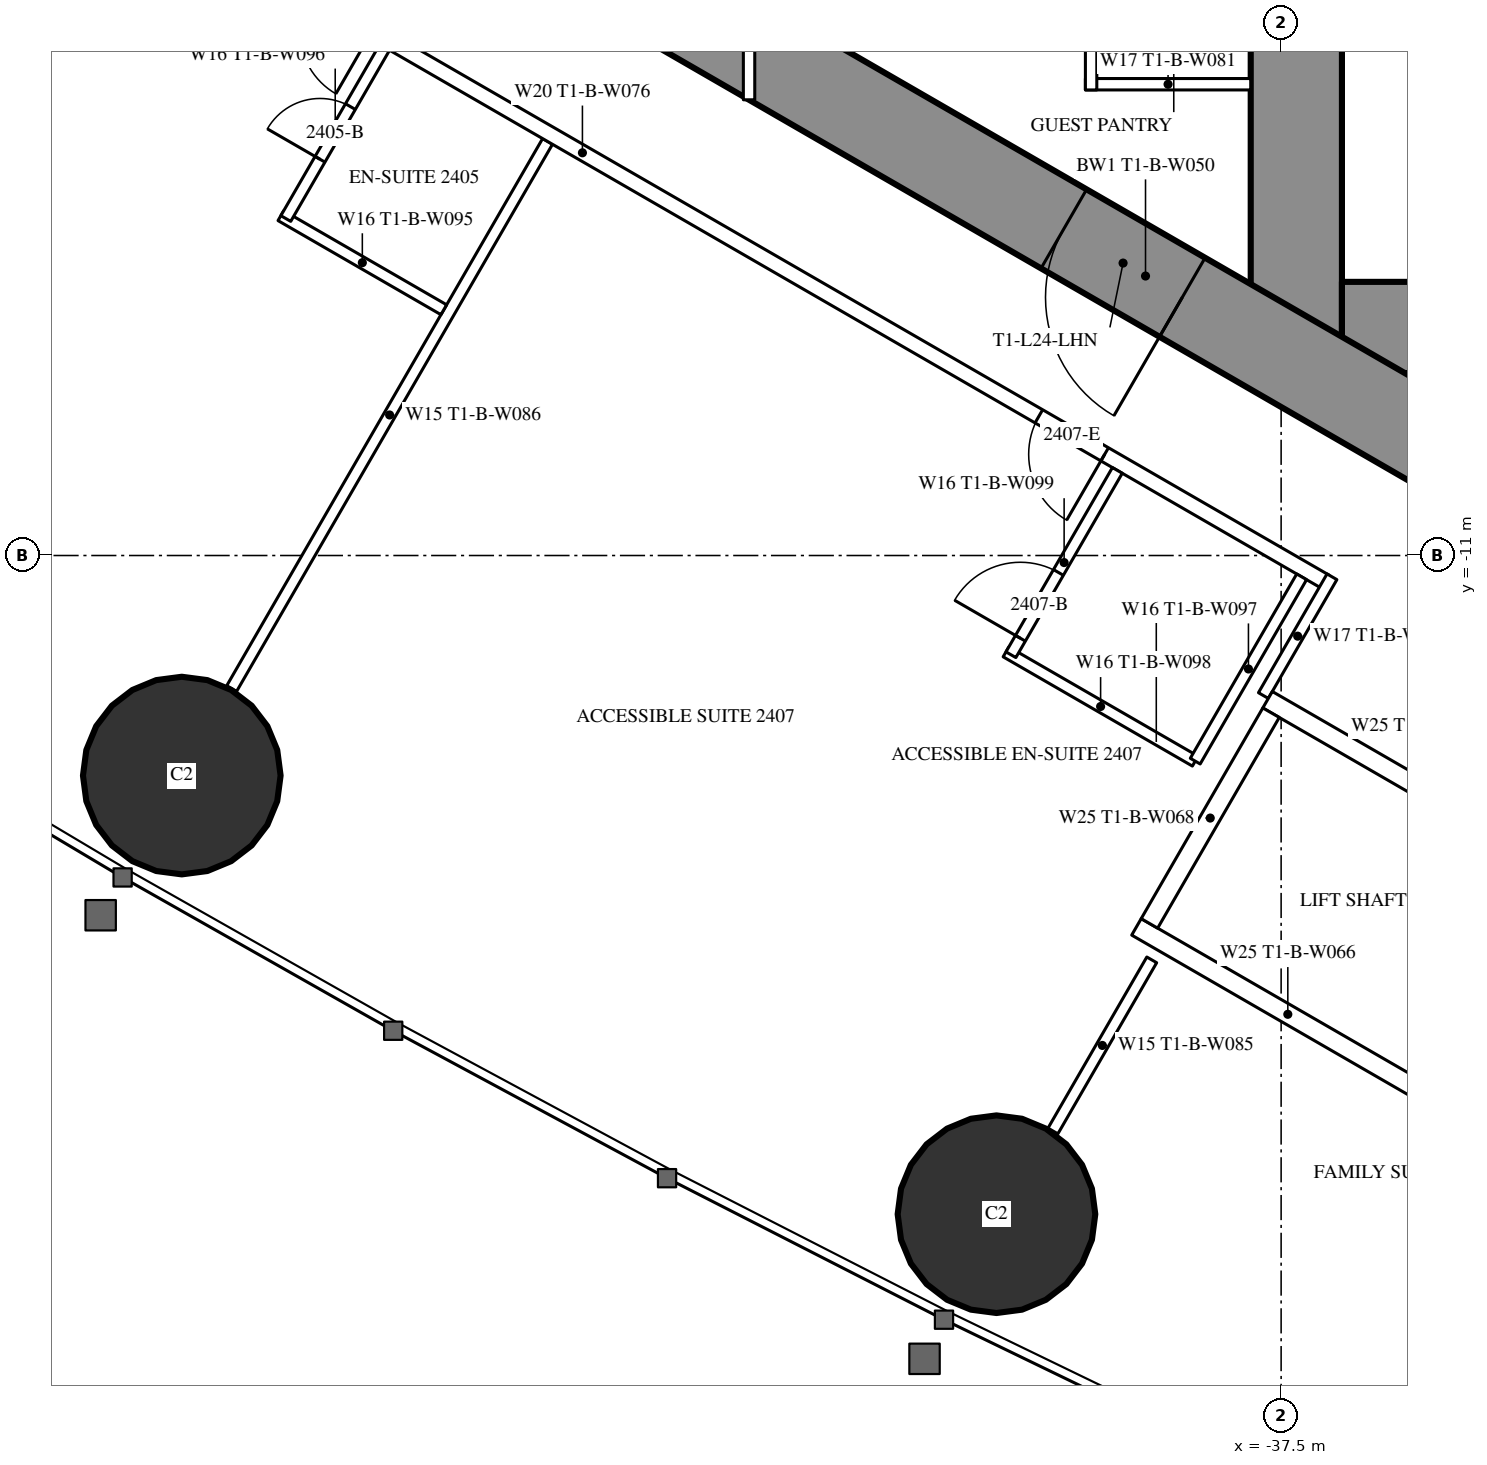
"""IFC4 building model, lengths in metres.
Left out: names, types, materials, properties, quantities, classifications, styles, units other than length and angle.
Written with IfcOpenShell. Run it as: python <this file> out.ifc"""

import sys

from ifc_helpers import new_model, si_unit, direction, frame, frame_2d, origin, origin_2d, place, context, subcontext, project, spatial, rectangle, hollow_circle, extrude, element, fill, save


model = new_model("IFC4")
c1 = context("Model", 3, precision=1e-05, world=origin(), true_north=direction((0.0, 1.0)))
c2 = subcontext(c1, "Body", "Model", "MODEL_VIEW")
j1 = project(units=[si_unit("LENGTHUNIT", "METRE"), si_unit("PLANEANGLEUNIT", "RADIAN")], contexts=[c1])
p1 = place(None, origin())
s1 = spatial("IfcSite", under=j1, at=p1, CompositionType="ELEMENT")
p2 = place(p1, origin())
s2 = spatial("IfcBuilding", under=s1, at=p2, CompositionType="ELEMENT")
p3 = place(p2, frame((0.0, 0.0, 94.1)))
s3 = spatial("IfcBuildingStorey", under=s2, at=p3, CompositionType="ELEMENT", Elevation=94.1)
for number, where, z_axis, x_axis in (
    (1, (-51.963, -13.895, 0.0), (0.0, 0.0, 1.0), (1.0, 0.0, 0.0)),
    (2, (-41.245, -19.666, 0.0), (0.0, 0.0, 1.0), (1.0, 0.0, 0.0)),
):
    element("IfcColumn", number, at=place(p3, frame(where, z_axis=z_axis, x_axis=x_axis)), inside=s3, PredefinedType="COLUMN", context=c2, shape_type="SweptSolid", body=[
        extrude(hollow_circle(Radius=1.3, WallThickness=0.1, at=origin_2d()), origin(), (0.0, 0.0, 1.0), 3.5),
    ])
p4 = place(p3, frame((-37.3, 8.6, 0.0), z_axis=(0.0, 0.0, 1.0), x_axis=(0.0, -1.0, 0.0)))
e3 = element("IfcWall", 3, at=p4, inside=s3, PredefinedType="SHEAR", context=c2, shape_type="SweptSolid", body=[
    extrude(rectangle(XDim=17.2, YDim=1.2, at=frame_2d((8.6, 0.0))), origin(), (0.0, 0.0, 1.0), 3.5),
])
p5 = place(p4, frame((7.7, 0.0, 0.0)))
e4 = element("IfcOpeningElement", 4, at=p5, cuts=e3, PredefinedType="OPENING", context=c2, shape_type="SweptSolid", body=[
    extrude(rectangle(XDim=1.8, YDim=2.2, at=frame_2d((0.9, 1.1))), frame((0.0, 0.61, 0.0), z_axis=(0.0, -1.0, 0.0), x_axis=(1.0, 0.0, 0.0)), (0.0, 0.0, 1.0), 1.22),
])
p6 = place(p3, frame((-28.3, -8.0, 0.0), z_axis=(0.0, 0.0, 1.0), x_axis=(-1.0, 0.0, 0.0)))
e5 = element("IfcWall", 5, at=p6, inside=s3, PredefinedType="SHEAR", context=c2, shape_type="SweptSolid", body=[
    extrude(rectangle(XDim=8.4, YDim=1.2, at=frame_2d((4.2, 0.0))), origin(), (0.0, 0.0, 1.0), 3.5),
])
p7 = place(p6, frame((0.25, 0.0, 0.0)))
e6 = element("IfcOpeningElement", 6, at=p7, cuts=e5, PredefinedType="OPENING", context=c2, shape_type="SweptSolid", body=[
    extrude(rectangle(XDim=1.0, YDim=2.2, at=frame_2d((0.5, 1.1))), frame((0.0, 0.61, 0.0), z_axis=(0.0, -1.0, 0.0), x_axis=(1.0, 0.0, 0.0)), (0.0, 0.0, 1.0), 1.22),
])
p8 = place(p3, frame((-27.2, -14.3, 0.0), z_axis=(0.0, 0.0, 1.0), x_axis=(-0.866024021859, 0.500002393557, 0.0)))
e7 = element("IfcWall", 7, at=p8, inside=s3, PredefinedType="SHEAR", context=c2, shape_type="SweptSolid", body=[
    extrude(rectangle(XDim=27.907, YDim=1.2, at=frame_2d((13.954, 0.0))), origin(), (0.0, 0.0, 1.0), 3.5),
])
p9 = place(p8, frame((4.6, 0.0, 0.0)))
e8 = element("IfcOpeningElement", 8, at=p9, cuts=e7, PredefinedType="OPENING", context=c2, shape_type="SweptSolid", body=[
    extrude(rectangle(XDim=1.0, YDim=2.2, at=frame_2d((0.5, 1.1))), frame((0.0, 0.61, 0.0), z_axis=(0.0, -1.0, 0.0), x_axis=(1.0, 0.0, 0.0)), (0.0, 0.0, 1.0), 1.22),
])
p10 = place(p8, frame((13.395, 0.0, 0.0)))
e9 = element("IfcOpeningElement", 9, at=p10, cuts=e7, PredefinedType="OPENING", context=c2, shape_type="SweptSolid", body=[
    extrude(rectangle(XDim=1.8, YDim=2.2, at=frame_2d((0.9, 1.1))), frame((0.0, 0.61, 0.0), z_axis=(0.0, -1.0, 0.0), x_axis=(1.0, 0.0, 0.0)), (0.0, 0.0, 1.0), 1.22),
])
p11 = place(p3, frame((-47.151, -5.552, 0.0), z_axis=(0.0, 0.0, 1.0), x_axis=(-0.500003012045, -0.866023664773, 0.0)))
e10 = element("IfcWall", 10, at=p11, inside=s3, PredefinedType="PARTITIONING", context=c2, shape_type="SweptSolid", body=[
    extrude(rectangle(XDim=8.311, YDim=0.15, at=frame_2d((4.156, 0.0))), origin(), (0.0, 0.0, 1.0), 2.2),
])
p12 = place(p3, frame((-39.202, -16.32, 0.0), z_axis=(0.0, 0.0, 1.0), x_axis=(-0.49997716683, -0.86603858612, 0.0)))
e11 = element("IfcWall", 11, at=p12, inside=s3, PredefinedType="PARTITIONING", context=c2, shape_type="SweptSolid", body=[
    extrude(rectangle(XDim=2.6, YDim=0.15, at=frame_2d((1.3, 0.0))), origin(), (0.0, 0.0, 1.0), 3.25),
])
p13 = place(p3, frame((-36.92, -11.344, 0.0), z_axis=(0.0, 0.0, 1.0), x_axis=(-0.866028313256, 0.499994960614, 0.0)))
e12 = element("IfcWall", 12, at=p13, inside=s3, PredefinedType="PARTITIONING", context=c2, shape_type="SweptSolid", body=[
    extrude(rectangle(XDim=22.568, YDim=0.2, at=frame_2d((11.284, 0.0))), origin(), (0.0, 0.0, 1.0), 3.25),
])
p14 = place(p13, frame((14.481, 0.0, 0.0)))
e13 = element("IfcOpeningElement", 13, at=p14, cuts=e12, PredefinedType="OPENING", context=c2, shape_type="SweptSolid", body=[
    extrude(rectangle(XDim=0.95, YDim=2.2, at=frame_2d((0.475, 1.1))), frame((0.0, 0.11, 0.0), z_axis=(0.0, -1.0, 0.0), x_axis=(1.0, 0.0, 0.0)), (0.0, 0.0, 1.0), 0.22),
])
p15 = place(p13, frame((3.35, 0.0, 0.0)))
e14 = element("IfcOpeningElement", 14, at=p15, cuts=e12, PredefinedType="OPENING", context=c2, shape_type="SweptSolid", body=[
    extrude(rectangle(XDim=1.0, YDim=2.2, at=frame_2d((0.5, 1.1))), frame((0.0, 0.11, 0.0), z_axis=(0.0, -1.0, 0.0), x_axis=(1.0, 0.0, 0.0)), (0.0, 0.0, 1.0), 0.22),
])
p16 = place(p3, frame((-36.831, -11.28, 0.0), z_axis=(0.0, 0.0, 1.0), x_axis=(-0.499937177781, -0.866061671171, 0.0)))
e15 = element("IfcWall", 15, at=p16, inside=s3, PredefinedType="PARTITIONING", context=c2, shape_type="SweptSolid", body=[
    extrude(rectangle(XDim=1.804, YDim=0.15, at=frame_2d((0.902, 0.0))), origin(), (0.0, 0.0, 1.0), 3.25),
])
p17 = place(p3, frame((-48.516, -7.767, 0.0), z_axis=(0.0, 0.0, 1.0), x_axis=(-0.866031185235, 0.4999899861, 0.0)))
e16 = element("IfcWall", 16, at=p17, inside=s3, PredefinedType="PARTITIONING", context=c2, shape_type="SweptSolid", body=[
    extrude(rectangle(XDim=2.475, YDim=0.15, at=frame_2d((1.238, 0.0))), origin(), (0.0, 0.0, 1.0), 3.25),
])
p18 = place(p3, frame((-49.295, -4.315, 0.0), z_axis=(0.0, 0.0, 1.0), x_axis=(-0.499936506574, -0.866062058628, 0.0)))
e17 = element("IfcWall", 17, at=p18, inside=s3, PredefinedType="PARTITIONING", context=c2, shape_type="SweptSolid", body=[
    extrude(rectangle(XDim=2.6, YDim=0.15, at=frame_2d((1.3, 0.0))), origin(), (0.0, 0.0, 1.0), 3.25),
])
p19 = place(p18, frame((0.9, 0.0, 0.0)))
e18 = element("IfcOpeningElement", 18, at=p19, cuts=e17, PredefinedType="OPENING", context=c2, shape_type="SweptSolid", body=[
    extrude(rectangle(XDim=0.8, YDim=2.2, at=frame_2d((0.4, 1.1))), frame((0.0, 0.085, 0.0), z_axis=(0.0, -1.0, 0.0), x_axis=(1.0, 0.0, 0.0)), (0.0, 0.0, 1.0), 0.17),
])
p20 = place(p3, frame((-38.63, -13.705, 0.0), z_axis=(0.0, 0.0, 1.0), x_axis=(-0.866018712932, 0.500011588718, 0.0)))
e19 = element("IfcWall", 19, at=p20, inside=s3, PredefinedType="PARTITIONING", context=c2, shape_type="SweptSolid", body=[
    extrude(rectangle(XDim=2.875, YDim=0.15, at=frame_2d((1.438, 0.0))), origin(), (0.0, 0.0, 1.0), 3.25),
])
p21 = place(p3, frame((-39.655, -9.88, 0.0), z_axis=(0.0, 0.0, 1.0), x_axis=(-0.500049511043, -0.865996816683, 0.0)))
e20 = element("IfcWall", 20, at=p21, inside=s3, PredefinedType="PARTITIONING", context=c2, shape_type="SweptSolid", body=[
    extrude(rectangle(XDim=2.8, YDim=0.15, at=frame_2d((1.4, 0.0))), origin(), (0.0, 0.0, 1.0), 3.25),
])
p22 = place(p21, frame((1.55, 0.0, 0.0)))
e21 = element("IfcOpeningElement", 21, at=p22, cuts=e20, PredefinedType="OPENING", context=c2, shape_type="SweptSolid", body=[
    extrude(rectangle(XDim=1.0, YDim=2.2, at=frame_2d((0.5, 1.1))), frame((0.0, 0.085, 0.0), z_axis=(0.0, -1.0, 0.0), x_axis=(1.0, 0.0, 0.0)), (0.0, 0.0, 1.0), 0.17),
])
p23 = place(p3, frame((-37.23, -11.281, 0.0), z_axis=(0.0, 0.0, 1.0), x_axis=(-0.500049511043, -0.865996816683, 0.0)))
e22 = element("IfcWall", 22, at=p23, inside=s3, PredefinedType="PARTITIONING", context=c2, shape_type="SweptSolid", body=[
    extrude(rectangle(XDim=2.8, YDim=0.15, at=frame_2d((1.4, 0.0))), origin(), (0.0, 0.0, 1.0), 3.25),
])
p24 = place(p3, frame((-37.9, -4.8, 0.0), z_axis=(0.0, 0.0, 1.0), x_axis=(-1.0, 0.0, 0.0)))
e23 = element("IfcWall", 23, at=p24, inside=s3, PredefinedType="PARTITIONING", context=c2, shape_type="SweptSolid", body=[
    extrude(rectangle(XDim=2.175, YDim=0.15, at=frame_2d((1.087, 0.0))), origin(), (0.0, 0.0, 1.0), 3.25),
])
p25 = place(p3, frame((-40.0, -2.525, 0.0), z_axis=(0.0, 0.0, 1.0), x_axis=(0.0, -1.0, 0.0)))
e24 = element("IfcWall", 24, at=p25, inside=s3, PredefinedType="PARTITIONING", context=c2, shape_type="SweptSolid", body=[
    extrude(rectangle(XDim=2.35, YDim=0.15, at=frame_2d((1.175, 0.0))), origin(), (0.0, 0.0, 1.0), 3.25),
])
p26 = place(p25, frame((0.675, 0.0, 0.0)))
e25 = element("IfcOpeningElement", 25, at=p26, cuts=e24, PredefinedType="OPENING", context=c2, shape_type="SweptSolid", body=[
    extrude(rectangle(XDim=1.0, YDim=2.2, at=frame_2d((0.5, 1.1))), frame((0.0, 0.085, 0.0), z_axis=(0.0, -1.0, 0.0), x_axis=(1.0, 0.0, 0.0)), (0.0, 0.0, 1.0), 0.17),
])
p27 = place(p3, frame((-44.5, 5.005, 0.0), z_axis=(0.0, 0.0, 1.0), x_axis=(0.0, -1.0, 0.0)))
e26 = element("IfcWall", 26, at=p27, inside=s3, PredefinedType="PARTITIONING", context=c2, shape_type="SweptSolid", body=[
    extrude(rectangle(XDim=10.009, YDim=0.15, at=frame_2d((5.005, 0.0))), origin(), (0.0, 0.0, 1.0), 2.45),
])
p28 = place(p27, frame((2.002, 0.0, 0.0)))
e27 = element("IfcOpeningElement", 27, at=p28, cuts=e26, PredefinedType="OPENING", context=c2, shape_type="SweptSolid", body=[
    extrude(rectangle(XDim=1.0, YDim=2.2, at=frame_2d((0.5, 1.1))), frame((0.0, 0.085, 0.0), z_axis=(0.0, -1.0, 0.0), x_axis=(1.0, 0.0, 0.0)), (0.0, 0.0, 1.0), 0.17),
])
p29 = place(p27, frame((7.007, 0.0, 0.0)))
e28 = element("IfcOpeningElement", 28, at=p29, cuts=e26, PredefinedType="OPENING", context=c2, shape_type="SweptSolid", body=[
    extrude(rectangle(XDim=1.0, YDim=2.2, at=frame_2d((0.5, 1.1))), frame((0.0, 0.085, 0.0), z_axis=(0.0, -1.0, 0.0), x_axis=(1.0, 0.0, 0.0)), (0.0, 0.0, 1.0), 0.17),
])
p30 = place(p3, frame((-33.696, -15.197, 0.0), z_axis=(0.0, 0.0, 1.0), x_axis=(-0.865976953817, 0.500083908417, 0.0)))
e29 = element("IfcWall", 29, at=p30, inside=s3, PredefinedType="PARTITIONING", context=c2, shape_type="SweptSolid", body=[
    extrude(rectangle(XDim=4.599, YDim=0.25, at=frame_2d((2.3, 0.0))), origin(), (0.0, 0.0, 1.0), 3.25),
])
p31 = place(p3, frame((-35.42, -18.186, 0.0), z_axis=(0.0, 0.0, 1.0), x_axis=(-0.865990227814, 0.50006092162, 0.0)))
e30 = element("IfcWall", 30, at=p31, inside=s3, PredefinedType="PARTITIONING", context=c2, shape_type="SweptSolid", body=[
    extrude(rectangle(XDim=4.6, YDim=0.25, at=frame_2d((2.3, 0.0))), origin(), (0.0, 0.0, 1.0), 3.25),
])
p32 = place(p3, frame((-37.633, -13.068, 0.0), z_axis=(0.0, 0.0, 1.0), x_axis=(-0.499872130319, -0.866099216793, 0.0)))
e31 = element("IfcWall", 31, at=p32, inside=s3, PredefinedType="PARTITIONING", context=c2, shape_type="SweptSolid", body=[
    extrude(rectangle(XDim=3.2, YDim=0.25, at=frame_2d((1.6, 0.0))), origin(), (0.0, 0.0, 1.0), 3.25),
])
p33 = place(p19, origin())
e32 = element("IfcDoor", 32, at=p33, inside=s3, OperationType="SINGLE_SWING_RIGHT", PredefinedType="DOOR", context=c2, shape_type="SweptSolid", body=[
    extrude(rectangle(XDim=0.8, YDim=2.2, at=frame_2d((0.4, 1.1))), frame((0.0, 0.025, 0.0), z_axis=(0.0, -1.0, 0.0), x_axis=(1.0, 0.0, 0.0)), (0.0, 0.0, 1.0), 0.05),
])
fill(e18, e32)
p34 = place(p22, origin())
e33 = element("IfcDoor", 33, at=p34, inside=s3, OperationType="SINGLE_SWING_RIGHT", PredefinedType="DOOR", context=c2, shape_type="SweptSolid", body=[
    extrude(rectangle(XDim=1.0, YDim=2.2, at=frame_2d((0.5, 1.1))), frame((0.0, 0.025, 0.0), z_axis=(0.0, -1.0, 0.0), x_axis=(1.0, 0.0, 0.0)), (0.0, 0.0, 1.0), 0.05),
])
fill(e21, e33)
p35 = place(p15, origin())
e34 = element("IfcDoor", 34, at=p35, inside=s3, OperationType="SINGLE_SWING_LEFT", PredefinedType="DOOR", context=c2, shape_type="SweptSolid", body=[
    extrude(rectangle(XDim=1.0, YDim=2.2, at=frame_2d((0.5, 1.1))), frame((0.0, 0.025, 0.0), z_axis=(0.0, -1.0, 0.0), x_axis=(1.0, 0.0, 0.0)), (0.0, 0.0, 1.0), 0.05),
])
fill(e14, e34)
p36 = place(p10, origin())
e35 = element("IfcDoor", 35, at=p36, inside=s3, OperationType="DOUBLE_DOOR_SINGLE_SWING", PredefinedType="DOOR", context=c2, shape_type="SweptSolid", body=[
    extrude(rectangle(XDim=1.8, YDim=2.2, at=frame_2d((0.9, 1.1))), frame((0.0, 0.025, 0.0), z_axis=(0.0, -1.0, 0.0), x_axis=(1.0, 0.0, 0.0)), (0.0, 0.0, 1.0), 0.05),
])
fill(e9, e35)
save(model, sys.argv[1])
